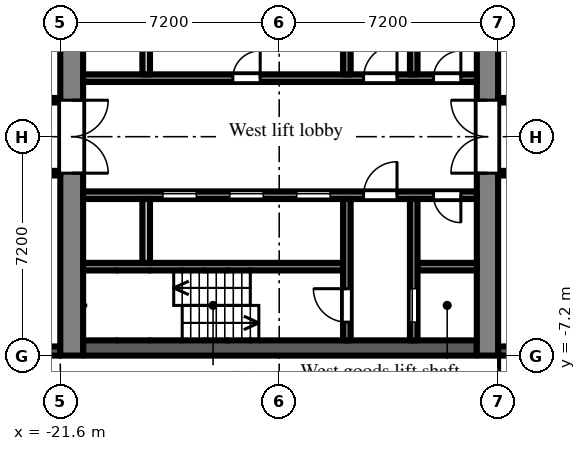
"""IFC4 building model, lengths in metres.
Left out: names, types, materials, properties, quantities, classifications, styles, units other than length and angle.
Written with IfcOpenShell. Run it as: python <this file> out.ifc"""

import sys

from ifc_helpers import new_model, si_unit, direction, frame, frame_2d, origin, place, context, subcontext, project, spatial, rectangle, extrude, element, fill, save


model = new_model("IFC4")
c1 = context("Model", 3, precision=1e-05, world=origin(), true_north=direction((0.0, 1.0)))
c2 = subcontext(c1, "Body", "Model", "MODEL_VIEW")
j1 = project(units=[si_unit("LENGTHUNIT", "METRE"), si_unit("PLANEANGLEUNIT", "RADIAN")], contexts=[c1])
p1 = place(None, origin())
s1 = spatial("IfcSite", under=j1, at=p1, CompositionType="ELEMENT")
p2 = place(p1, origin())
s2 = spatial("IfcBuilding", under=s1, at=p2, CompositionType="ELEMENT")
p3 = place(p2, frame((0.0, 0.0, 35.7)))
s3 = spatial("IfcBuildingStorey", under=s2, at=p3, CompositionType="ELEMENT", Elevation=35.7)
p4 = place(p3, frame((-24.3, -7.05, 0.0), z_axis=(0.0, 0.0, 1.0), x_axis=(1.0, 0.0, 0.0)))
e1 = element("IfcWall", 1, at=p4, inside=s3, PredefinedType="SOLIDWALL", context=c2, shape_type="SweptSolid", body=[
    extrude(rectangle(XDim=2.7, YDim=0.3, at=frame_2d((1.35, 0.0))), origin(), (0.0, 0.0, 1.0), 2.1),
])
p5 = place(p4, frame((0.75, 0.0, 0.2)))
e2 = element("IfcOpeningElement", 2, at=p5, cuts=e1, PredefinedType="OPENING", context=c2, shape_type="SweptSolid", body=[
    extrude(rectangle(XDim=1.2, YDim=1.85, at=frame_2d((0.6, 0.925))), frame((0.0, 0.16, 0.0), z_axis=(0.0, -1.0, 0.0), x_axis=(1.0, 0.0, 0.0)), (0.0, 0.0, 1.0), 0.32),
])
p6 = place(p3, frame((-7.2, -7.05, 0.0), z_axis=(0.0, 0.0, 1.0), x_axis=(1.0, 0.0, 0.0)))
e3 = element("IfcWall", 3, at=p6, inside=s3, PredefinedType="SOLIDWALL", context=c2, shape_type="SweptSolid", body=[
    extrude(rectangle(XDim=3.0, YDim=0.3, at=frame_2d((1.5, 0.0))), origin(), (0.0, 0.0, 1.0), 2.1),
])
p7 = place(p3, frame((-7.55, -7.2, 0.0), z_axis=(0.0, 0.0, 1.0), x_axis=(0.0, 1.0, 0.0)))
e4 = element("IfcWall", 4, at=p7, inside=s3, PredefinedType="SHEAR", context=c2, shape_type="SweptSolid", body=[
    extrude(rectangle(XDim=14.4, YDim=0.7, at=frame_2d((7.2, 0.0))), origin(), (0.0, 0.0, 1.0), 2.575),
])
p8 = place(p7, frame((6.0, 0.0, 0.0)))
e5 = element("IfcOpeningElement", 5, at=p8, cuts=e4, PredefinedType="OPENING", context=c2, shape_type="SweptSolid", body=[
    extrude(rectangle(XDim=2.4, YDim=2.2, at=frame_2d((1.2, 1.1))), frame((0.0, 0.36, 0.0), z_axis=(0.0, -1.0, 0.0), x_axis=(1.0, 0.0, 0.0)), (0.0, 0.0, 1.0), 0.72),
])
p9 = place(p3, frame((-21.225, -7.2, 0.0), z_axis=(0.0, 0.0, 1.0), x_axis=(0.0, 1.0, 0.0)))
e6 = element("IfcWall", 6, at=p9, inside=s3, PredefinedType="SHEAR", context=c2, shape_type="SweptSolid", body=[
    extrude(rectangle(XDim=14.4, YDim=0.75, at=frame_2d((7.2, 0.0))), origin(), (0.0, 0.0, 1.0), 2.575),
])
p10 = place(p9, frame((6.0, 0.0, 0.0)))
e7 = element("IfcOpeningElement", 7, at=p10, cuts=e6, PredefinedType="OPENING", context=c2, shape_type="SweptSolid", body=[
    extrude(rectangle(XDim=2.4, YDim=2.2, at=frame_2d((1.2, 1.1))), frame((0.0, 0.385, 0.0), z_axis=(0.0, -1.0, 0.0), x_axis=(1.0, 0.0, 0.0)), (0.0, 0.0, 1.0), 0.77),
])
p11 = place(p3, frame((-7.9, 1.925, 0.0), z_axis=(0.0, 0.0, 1.0), x_axis=(-1.0, 0.0, 0.0)))
e8 = element("IfcWall", 8, at=p11, inside=s3, PredefinedType="SHEAR", context=c2, shape_type="SweptSolid", body=[
    extrude(rectangle(XDim=12.95, YDim=0.25, at=frame_2d((6.475, 0.0))), origin(), (0.0, 0.0, 1.0), 2.575),
])
p12 = place(p11, frame((0.525, 0.0, 0.0)))
e9 = element("IfcOpeningElement", 9, at=p12, cuts=e8, PredefinedType="OPENING", context=c2, shape_type="SweptSolid", body=[
    extrude(rectangle(XDim=0.9, YDim=2.1, at=frame_2d((0.45, 1.05))), frame((0.0, 0.135, 0.0), z_axis=(0.0, -1.0, 0.0), x_axis=(1.0, 0.0, 0.0)), (0.0, 0.0, 1.0), 0.27),
])
p13 = place(p11, frame((2.625, 0.0, 0.0)))
e10 = element("IfcOpeningElement", 10, at=p13, cuts=e8, PredefinedType="OPENING", context=c2, shape_type="SweptSolid", body=[
    extrude(rectangle(XDim=1.1, YDim=2.1, at=frame_2d((0.55, 1.05))), frame((0.0, 0.135, 0.0), z_axis=(0.0, -1.0, 0.0), x_axis=(1.0, 0.0, 0.0)), (0.0, 0.0, 1.0), 0.27),
])
p14 = place(p11, frame((7.125, 0.0, 0.0)))
e11 = element("IfcOpeningElement", 11, at=p14, cuts=e8, PredefinedType="OPENING", context=c2, shape_type="SweptSolid", body=[
    extrude(rectangle(XDim=0.9, YDim=2.1, at=frame_2d((0.45, 1.05))), frame((0.0, 0.135, 0.0), z_axis=(0.0, -1.0, 0.0), x_axis=(1.0, 0.0, 0.0)), (0.0, 0.0, 1.0), 0.27),
])
p15 = place(p3, frame((-9.975, 2.05, 0.0), z_axis=(0.0, 0.0, 1.0), x_axis=(0.0, 1.0, 0.0)))
e12 = element("IfcWall", 12, at=p15, inside=s3, PredefinedType="SHEAR", context=c2, shape_type="SweptSolid", body=[
    extrude(rectangle(XDim=4.65, YDim=0.25, at=frame_2d((2.325, 0.0))), origin(), (0.0, 0.0, 1.0), 2.575),
])
p16 = place(p15, frame((2.95, 0.0, 0.0)))
e13 = element("IfcOpeningElement", 13, at=p16, cuts=e12, PredefinedType="OPENING", context=c2, shape_type="SweptSolid", body=[
    extrude(rectangle(XDim=1.1, YDim=2.1, at=frame_2d((0.55, 1.05))), frame((0.0, 0.135, 0.0), z_axis=(0.0, -1.0, 0.0), x_axis=(1.0, 0.0, 0.0)), (0.0, 0.0, 1.0), 0.27),
])
p17 = place(p3, frame((-12.175, 2.05, 0.0), z_axis=(0.0, 0.0, 1.0), x_axis=(0.0, 1.0, 0.0)))
e14 = element("IfcWall", 14, at=p17, inside=s3, PredefinedType="SHEAR", context=c2, shape_type="SweptSolid", body=[
    extrude(rectangle(XDim=4.65, YDim=0.25, at=frame_2d((2.325, 0.0))), origin(), (0.0, 0.0, 1.0), 2.575),
])
p18 = place(p17, frame((2.95, 0.0, 0.0)))
e15 = element("IfcOpeningElement", 15, at=p18, cuts=e14, PredefinedType="OPENING", context=c2, shape_type="SweptSolid", body=[
    extrude(rectangle(XDim=1.1, YDim=2.1, at=frame_2d((0.55, 1.05))), frame((0.0, 0.135, 0.0), z_axis=(0.0, -1.0, 0.0), x_axis=(1.0, 0.0, 0.0)), (0.0, 0.0, 1.0), 0.27),
])
p19 = place(p3, frame((-18.775, 2.05, 0.0), z_axis=(0.0, 0.0, 1.0), x_axis=(0.0, 1.0, 0.0)))
e16 = element("IfcWall", 16, at=p19, inside=s3, PredefinedType="PARTITIONING", context=c2, shape_type="SweptSolid", body=[
    extrude(rectangle(XDim=2.1, YDim=0.25, at=frame_2d((1.05, 0.0))), origin(), (0.0, 0.0, 1.0), 2.575),
])
p20 = place(p3, frame((-7.9, -6.95, 0.0), z_axis=(0.0, 0.0, 1.0), x_axis=(-1.0, 0.0, 0.0)))
e17 = element("IfcWall", 17, at=p20, inside=s3, PredefinedType="SHEAR", context=c2, shape_type="SweptSolid", body=[
    extrude(rectangle(XDim=12.95, YDim=0.5, at=frame_2d((6.475, 0.0))), origin(), (0.0, 0.0, 1.0), 2.575),
])
p21 = place(p3, frame((-7.9, -1.925, 0.0), z_axis=(0.0, 0.0, 1.0), x_axis=(-1.0, 0.0, 0.0)))
e18 = element("IfcWall", 18, at=p21, inside=s3, PredefinedType="SHEAR", context=c2, shape_type="SweptSolid", body=[
    extrude(rectangle(XDim=12.95, YDim=0.25, at=frame_2d((6.475, 0.0))), origin(), (0.0, 0.0, 1.0), 2.575),
])
p22 = place(p21, frame((4.825, 0.0, 0.0)))
e19 = element("IfcOpeningElement", 19, at=p22, cuts=e18, PredefinedType="OPENING", context=c2, shape_type="SweptSolid", body=[
    extrude(rectangle(XDim=1.1, YDim=2.1, at=frame_2d((0.55, 1.05))), frame((0.0, 0.135, 0.0), z_axis=(0.0, -1.0, 0.0), x_axis=(1.0, 0.0, 0.0)), (0.0, 0.0, 1.0), 0.27),
])
p23 = place(p21, frame((7.025, 0.0, 0.0)))
e20 = element("IfcOpeningElement", 20, at=p23, cuts=e18, PredefinedType="OPENING", context=c2, shape_type="SweptSolid", body=[
    extrude(rectangle(XDim=1.1, YDim=2.1, at=frame_2d((0.55, 1.05))), frame((0.0, 0.135, 0.0), z_axis=(0.0, -1.0, 0.0), x_axis=(1.0, 0.0, 0.0)), (0.0, 0.0, 1.0), 0.27),
])
p24 = place(p21, frame((9.225, 0.0, 0.0)))
e21 = element("IfcOpeningElement", 21, at=p24, cuts=e18, PredefinedType="OPENING", context=c2, shape_type="SweptSolid", body=[
    extrude(rectangle(XDim=1.1, YDim=2.1, at=frame_2d((0.55, 1.05))), frame((0.0, 0.135, 0.0), z_axis=(0.0, -1.0, 0.0), x_axis=(1.0, 0.0, 0.0)), (0.0, 0.0, 1.0), 0.27),
])
p25 = place(p21, frame((0.525, 0.0, 0.0)))
e22 = element("IfcOpeningElement", 22, at=p25, cuts=e18, PredefinedType="OPENING", context=c2, shape_type="SweptSolid", body=[
    extrude(rectangle(XDim=0.9, YDim=2.1, at=frame_2d((0.45, 1.05))), frame((0.0, 0.135, 0.0), z_axis=(0.0, -1.0, 0.0), x_axis=(1.0, 0.0, 0.0)), (0.0, 0.0, 1.0), 0.27),
])
p26 = place(p21, frame((2.625, 0.0, 0.0)))
e23 = element("IfcOpeningElement", 23, at=p26, cuts=e18, PredefinedType="OPENING", context=c2, shape_type="SweptSolid", body=[
    extrude(rectangle(XDim=1.1, YDim=2.1, at=frame_2d((0.55, 1.05))), frame((0.0, 0.135, 0.0), z_axis=(0.0, -1.0, 0.0), x_axis=(1.0, 0.0, 0.0)), (0.0, 0.0, 1.0), 0.27),
])
p27 = place(p3, frame((-7.9, -4.275, 0.0), z_axis=(0.0, 0.0, 1.0), x_axis=(-1.0, 0.0, 0.0)))
e24 = element("IfcWall", 24, at=p27, inside=s3, PredefinedType="SHEAR", context=c2, shape_type="SweptSolid", body=[
    extrude(rectangle(XDim=1.95, YDim=0.25, at=frame_2d((0.975, 0.0))), origin(), (0.0, 0.0, 1.0), 2.575),
])
p28 = place(p3, frame((-12.3, -4.275, 0.0), z_axis=(0.0, 0.0, 1.0), x_axis=(-1.0, 0.0, 0.0)))
e25 = element("IfcWall", 25, at=p28, inside=s3, PredefinedType="SHEAR", context=c2, shape_type="SweptSolid", body=[
    extrude(rectangle(XDim=8.55, YDim=0.25, at=frame_2d((4.275, 0.0))), origin(), (0.0, 0.0, 1.0), 2.575),
])
p29 = place(p3, frame((-9.975, -2.05, 0.0), z_axis=(0.0, 0.0, 1.0), x_axis=(0.0, -1.0, 0.0)))
e26 = element("IfcWall", 26, at=p29, inside=s3, PredefinedType="SHEAR", context=c2, shape_type="SweptSolid", body=[
    extrude(rectangle(XDim=4.65, YDim=0.25, at=frame_2d((2.325, 0.0))), origin(), (0.0, 0.0, 1.0), 2.575),
])
p30 = place(p29, frame((2.95, 0.0, 0.0)))
e27 = element("IfcOpeningElement", 27, at=p30, cuts=e26, PredefinedType="OPENING", context=c2, shape_type="SweptSolid", body=[
    extrude(rectangle(XDim=1.1, YDim=2.1, at=frame_2d((0.55, 1.05))), frame((0.0, 0.135, 0.0), z_axis=(0.0, -1.0, 0.0), x_axis=(1.0, 0.0, 0.0)), (0.0, 0.0, 1.0), 0.27),
])
p31 = place(p3, frame((-12.175, -2.05, 0.0), z_axis=(0.0, 0.0, 1.0), x_axis=(0.0, -1.0, 0.0)))
e28 = element("IfcWall", 28, at=p31, inside=s3, PredefinedType="SHEAR", context=c2, shape_type="SweptSolid", body=[
    extrude(rectangle(XDim=4.65, YDim=0.25, at=frame_2d((2.325, 0.0))), origin(), (0.0, 0.0, 1.0), 2.575),
])
p32 = place(p31, frame((2.95, 0.0, 0.0)))
e29 = element("IfcOpeningElement", 29, at=p32, cuts=e28, PredefinedType="OPENING", context=c2, shape_type="SweptSolid", body=[
    extrude(rectangle(XDim=1.1, YDim=2.1, at=frame_2d((0.55, 1.05))), frame((0.0, 0.135, 0.0), z_axis=(0.0, -1.0, 0.0), x_axis=(1.0, 0.0, 0.0)), (0.0, 0.0, 1.0), 0.27),
])
p33 = place(p3, frame((-18.775, -2.05, 0.0), z_axis=(0.0, 0.0, 1.0), x_axis=(0.0, -1.0, 0.0)))
e30 = element("IfcWall", 30, at=p33, inside=s3, PredefinedType="PARTITIONING", context=c2, shape_type="SweptSolid", body=[
    extrude(rectangle(XDim=2.1, YDim=0.25, at=frame_2d((1.05, 0.0))), origin(), (0.0, 0.0, 1.0), 2.575),
])
p34 = place(p3, frame((-36.5, -1.2, 0.0), z_axis=(0.0, 0.0, 1.0), x_axis=(1.0, 0.0, 0.0)))
e31 = element("IfcWall", 31, at=p34, inside=s3, PredefinedType="PARTITIONING", context=c2, shape_type="SweptSolid", body=[
    extrude(rectangle(XDim=14.9, YDim=0.15, at=frame_2d((7.45, 0.0))), origin(), (0.0, 0.0, 1.0), 2.575),
])
p35 = place(p34, frame((10.4, 0.0, 0.0)))
e32 = element("IfcOpeningElement", 32, at=p35, cuts=e31, PredefinedType="OPENING", context=c2, shape_type="SweptSolid", body=[
    extrude(rectangle(XDim=1.8, YDim=2.1, at=frame_2d((0.9, 1.05))), frame((0.0, 0.085, 0.0), z_axis=(0.0, -1.0, 0.0), x_axis=(1.0, 0.0, 0.0)), (0.0, 0.0, 1.0), 0.17),
])
p36 = place(p34, frame((6.35, 0.0, 0.0)))
e33 = element("IfcOpeningElement", 33, at=p36, cuts=e31, PredefinedType="OPENING", context=c2, shape_type="SweptSolid", body=[
    extrude(rectangle(XDim=0.9, YDim=2.1, at=frame_2d((0.45, 1.05))), frame((0.0, 0.085, 0.0), z_axis=(0.0, -1.0, 0.0), x_axis=(1.0, 0.0, 0.0)), (0.0, 0.0, 1.0), 0.17),
])
p37 = place(p34, frame((4.55, 0.0, 0.0)))
e34 = element("IfcOpeningElement", 34, at=p37, cuts=e31, PredefinedType="OPENING", context=c2, shape_type="SweptSolid", body=[
    extrude(rectangle(XDim=0.9, YDim=2.1, at=frame_2d((0.45, 1.05))), frame((0.0, 0.085, 0.0), z_axis=(0.0, -1.0, 0.0), x_axis=(1.0, 0.0, 0.0)), (0.0, 0.0, 1.0), 0.17),
])
p38 = place(p34, frame((1.15, 0.0, 0.0)))
e35 = element("IfcOpeningElement", 35, at=p38, cuts=e31, PredefinedType="OPENING", context=c2, shape_type="SweptSolid", body=[
    extrude(rectangle(XDim=1.8, YDim=2.1, at=frame_2d((0.9, 1.05))), frame((0.0, 0.085, 0.0), z_axis=(0.0, -1.0, 0.0), x_axis=(1.0, 0.0, 0.0)), (0.0, 0.0, 1.0), 0.17),
])
p39 = place(p3, frame((-36.5, 1.2, 0.0), z_axis=(0.0, 0.0, 1.0), x_axis=(1.0, 0.0, 0.0)))
e36 = element("IfcWall", 36, at=p39, inside=s3, PredefinedType="PARTITIONING", context=c2, shape_type="SweptSolid", body=[
    extrude(rectangle(XDim=14.9, YDim=0.15, at=frame_2d((7.45, 0.0))), origin(), (0.0, 0.0, 1.0), 2.575),
])
p40 = place(p39, frame((10.1, 0.0, 0.0)))
e37 = element("IfcOpeningElement", 37, at=p40, cuts=e36, PredefinedType="OPENING", context=c2, shape_type="SweptSolid", body=[
    extrude(rectangle(XDim=1.0, YDim=2.1, at=frame_2d((0.5, 1.05))), frame((0.0, 0.085, 0.0), z_axis=(0.0, -1.0, 0.0), x_axis=(1.0, 0.0, 0.0)), (0.0, 0.0, 1.0), 0.17),
])
p41 = place(p39, frame((5.45, 0.0, 0.0)))
e38 = element("IfcOpeningElement", 38, at=p41, cuts=e36, PredefinedType="OPENING", context=c2, shape_type="SweptSolid", body=[
    extrude(rectangle(XDim=0.9, YDim=2.1, at=frame_2d((0.45, 1.05))), frame((0.0, 0.085, 0.0), z_axis=(0.0, -1.0, 0.0), x_axis=(1.0, 0.0, 0.0)), (0.0, 0.0, 1.0), 0.17),
])
p42 = place(p39, frame((1.15, 0.0, 0.0)))
e39 = element("IfcOpeningElement", 39, at=p42, cuts=e36, PredefinedType="OPENING", context=c2, shape_type="SweptSolid", body=[
    extrude(rectangle(XDim=1.8, YDim=2.1, at=frame_2d((0.9, 1.05))), frame((0.0, 0.085, 0.0), z_axis=(0.0, -1.0, 0.0), x_axis=(1.0, 0.0, 0.0)), (0.0, 0.0, 1.0), 0.17),
])
p43 = place(p3, frame((-7.2, -1.2, 0.0), z_axis=(0.0, 0.0, 1.0), x_axis=(1.0, 0.0, 0.0)))
e40 = element("IfcWall", 40, at=p43, inside=s3, PredefinedType="PARTITIONING", context=c2, shape_type="SweptSolid", body=[
    extrude(rectangle(XDim=6.075, YDim=0.15, at=frame_2d((3.038, 0.0))), origin(), (0.0, 0.0, 1.0), 2.575),
])
p44 = place(p43, frame((1.95, 0.0, 0.0)))
e41 = element("IfcOpeningElement", 41, at=p44, cuts=e40, PredefinedType="OPENING", context=c2, shape_type="SweptSolid", body=[
    extrude(rectangle(XDim=0.9, YDim=2.1, at=frame_2d((0.45, 1.05))), frame((0.0, 0.085, 0.0), z_axis=(0.0, -1.0, 0.0), x_axis=(1.0, 0.0, 0.0)), (0.0, 0.0, 1.0), 0.17),
])
p45 = place(p3, frame((-7.2, 1.2, 0.0), z_axis=(0.0, 0.0, 1.0), x_axis=(1.0, 0.0, 0.0)))
e42 = element("IfcWall", 42, at=p45, inside=s3, PredefinedType="PARTITIONING", context=c2, shape_type="SweptSolid", body=[
    extrude(rectangle(XDim=6.075, YDim=0.15, at=frame_2d((3.038, 0.0))), origin(), (0.0, 0.0, 1.0), 2.575),
])
p46 = place(p45, frame((2.55, 0.0, 0.0)))
e43 = element("IfcOpeningElement", 43, at=p46, cuts=e42, PredefinedType="OPENING", context=c2, shape_type="SweptSolid", body=[
    extrude(rectangle(XDim=0.9, YDim=2.1, at=frame_2d((0.45, 1.05))), frame((0.0, 0.085, 0.0), z_axis=(0.0, -1.0, 0.0), x_axis=(1.0, 0.0, 0.0)), (0.0, 0.0, 1.0), 0.17),
])
p47 = place(p22, origin())
e44 = element("IfcDoor", 44, at=p47, inside=s3, OperationType="SLIDING_TO_LEFT", PredefinedType="DOOR", context=c2, shape_type="SweptSolid", body=[
    extrude(rectangle(XDim=1.1, YDim=2.1, at=frame_2d((0.55, 1.05))), frame((0.0, 0.025, 0.0), z_axis=(0.0, -1.0, 0.0), x_axis=(1.0, 0.0, 0.0)), (0.0, 0.0, 1.0), 0.05),
])
fill(e19, e44)
p48 = place(p23, origin())
e45 = element("IfcDoor", 45, at=p48, inside=s3, OperationType="SLIDING_TO_LEFT", PredefinedType="DOOR", context=c2, shape_type="SweptSolid", body=[
    extrude(rectangle(XDim=1.1, YDim=2.1, at=frame_2d((0.55, 1.05))), frame((0.0, 0.025, 0.0), z_axis=(0.0, -1.0, 0.0), x_axis=(1.0, 0.0, 0.0)), (0.0, 0.0, 1.0), 0.05),
])
fill(e20, e45)
p49 = place(p24, origin())
e46 = element("IfcDoor", 46, at=p49, inside=s3, OperationType="SLIDING_TO_LEFT", PredefinedType="DOOR", context=c2, shape_type="SweptSolid", body=[
    extrude(rectangle(XDim=1.1, YDim=2.1, at=frame_2d((0.55, 1.05))), frame((0.0, 0.025, 0.0), z_axis=(0.0, -1.0, 0.0), x_axis=(1.0, 0.0, 0.0)), (0.0, 0.0, 1.0), 0.05),
])
fill(e21, e46)
p50 = place(p30, origin())
e47 = element("IfcDoor", 47, at=p50, inside=s3, OperationType="SLIDING_TO_LEFT", PredefinedType="DOOR", context=c2, shape_type="SweptSolid", body=[
    extrude(rectangle(XDim=1.1, YDim=2.1, at=frame_2d((0.55, 1.05))), frame((0.0, 0.025, 0.0), z_axis=(0.0, -1.0, 0.0), x_axis=(1.0, 0.0, 0.0)), (0.0, 0.0, 1.0), 0.05),
])
fill(e27, e47)
p51 = place(p32, frame((1.1, 0.0, 0.0), z_axis=(0.0, 0.0, 1.0), x_axis=(-1.0, 0.0, 0.0)))
e48 = element("IfcDoor", 48, at=p51, inside=s3, OperationType="SINGLE_SWING_RIGHT", PredefinedType="DOOR", context=c2, shape_type="SweptSolid", body=[
    extrude(rectangle(XDim=1.1, YDim=2.1, at=frame_2d((0.55, 1.05))), frame((0.0, 0.025, 0.0), z_axis=(0.0, -1.0, 0.0), x_axis=(1.0, 0.0, 0.0)), (0.0, 0.0, 1.0), 0.05),
])
fill(e29, e48)
p52 = place(p12, frame((0.9, 0.0, 0.0), z_axis=(0.0, 0.0, 1.0), x_axis=(-1.0, 0.0, 0.0)))
e49 = element("IfcDoor", 49, at=p52, inside=s3, OperationType="SINGLE_SWING_RIGHT", PredefinedType="DOOR", context=c2, shape_type="SweptSolid", body=[
    extrude(rectangle(XDim=0.9, YDim=2.1, at=frame_2d((0.45, 1.05))), frame((0.0, 0.025, 0.0), z_axis=(0.0, -1.0, 0.0), x_axis=(1.0, 0.0, 0.0)), (0.0, 0.0, 1.0), 0.05),
])
fill(e9, e49)
p53 = place(p25, origin())
e50 = element("IfcDoor", 50, at=p53, inside=s3, OperationType="SINGLE_SWING_LEFT", PredefinedType="DOOR", context=c2, shape_type="SweptSolid", body=[
    extrude(rectangle(XDim=0.9, YDim=2.1, at=frame_2d((0.45, 1.05))), frame((0.0, 0.025, 0.0), z_axis=(0.0, -1.0, 0.0), x_axis=(1.0, 0.0, 0.0)), (0.0, 0.0, 1.0), 0.05),
])
fill(e22, e50)
p54 = place(p13, frame((1.1, 0.0, 0.0), z_axis=(0.0, 0.0, 1.0), x_axis=(-1.0, 0.0, 0.0)))
e51 = element("IfcDoor", 51, at=p54, inside=s3, OperationType="SINGLE_SWING_RIGHT", PredefinedType="DOOR", context=c2, shape_type="SweptSolid", body=[
    extrude(rectangle(XDim=1.1, YDim=2.1, at=frame_2d((0.55, 1.05))), frame((0.0, 0.025, 0.0), z_axis=(0.0, -1.0, 0.0), x_axis=(1.0, 0.0, 0.0)), (0.0, 0.0, 1.0), 0.05),
])
fill(e10, e51)
p55 = place(p26, frame((1.1, 0.0, 0.0), z_axis=(0.0, 0.0, 1.0), x_axis=(-1.0, 0.0, 0.0)))
e52 = element("IfcDoor", 52, at=p55, inside=s3, OperationType="SINGLE_SWING_RIGHT", PredefinedType="DOOR", context=c2, shape_type="SweptSolid", body=[
    extrude(rectangle(XDim=1.1, YDim=2.1, at=frame_2d((0.55, 1.05))), frame((0.0, 0.025, 0.0), z_axis=(0.0, -1.0, 0.0), x_axis=(1.0, 0.0, 0.0)), (0.0, 0.0, 1.0), 0.05),
])
fill(e23, e52)
p56 = place(p8, origin())
e53 = element("IfcDoor", 53, at=p56, inside=s3, OperationType="DOUBLE_DOOR_DOUBLE_SWING", PredefinedType="DOOR", context=c2, shape_type="SweptSolid", body=[
    extrude(rectangle(XDim=2.4, YDim=2.2, at=frame_2d((1.2, 1.1))), frame((0.0, 0.025, 0.0), z_axis=(0.0, -1.0, 0.0), x_axis=(1.0, 0.0, 0.0)), (0.0, 0.0, 1.0), 0.05),
])
fill(e5, e53)
p57 = place(p10, frame((2.4, 0.0, 0.0), z_axis=(0.0, 0.0, 1.0), x_axis=(-1.0, 0.0, 0.0)))
e54 = element("IfcDoor", 54, at=p57, inside=s3, OperationType="DOUBLE_DOOR_DOUBLE_SWING", PredefinedType="DOOR", context=c2, shape_type="SweptSolid", body=[
    extrude(rectangle(XDim=2.4, YDim=2.2, at=frame_2d((1.2, 1.1))), frame((0.0, 0.025, 0.0), z_axis=(0.0, -1.0, 0.0), x_axis=(1.0, 0.0, 0.0)), (0.0, 0.0, 1.0), 0.05),
])
fill(e7, e54)
p58 = place(p14, frame((0.9, 0.0, 0.0), z_axis=(0.0, 0.0, 1.0), x_axis=(-1.0, 0.0, 0.0)))
e55 = element("IfcDoor", 55, at=p58, inside=s3, OperationType="SINGLE_SWING_RIGHT", PredefinedType="DOOR", context=c2, shape_type="SweptSolid", body=[
    extrude(rectangle(XDim=0.9, YDim=2.1, at=frame_2d((0.45, 1.05))), frame((0.0, 0.025, 0.0), z_axis=(0.0, -1.0, 0.0), x_axis=(1.0, 0.0, 0.0)), (0.0, 0.0, 1.0), 0.05),
])
fill(e11, e55)
save(model, sys.argv[1])
